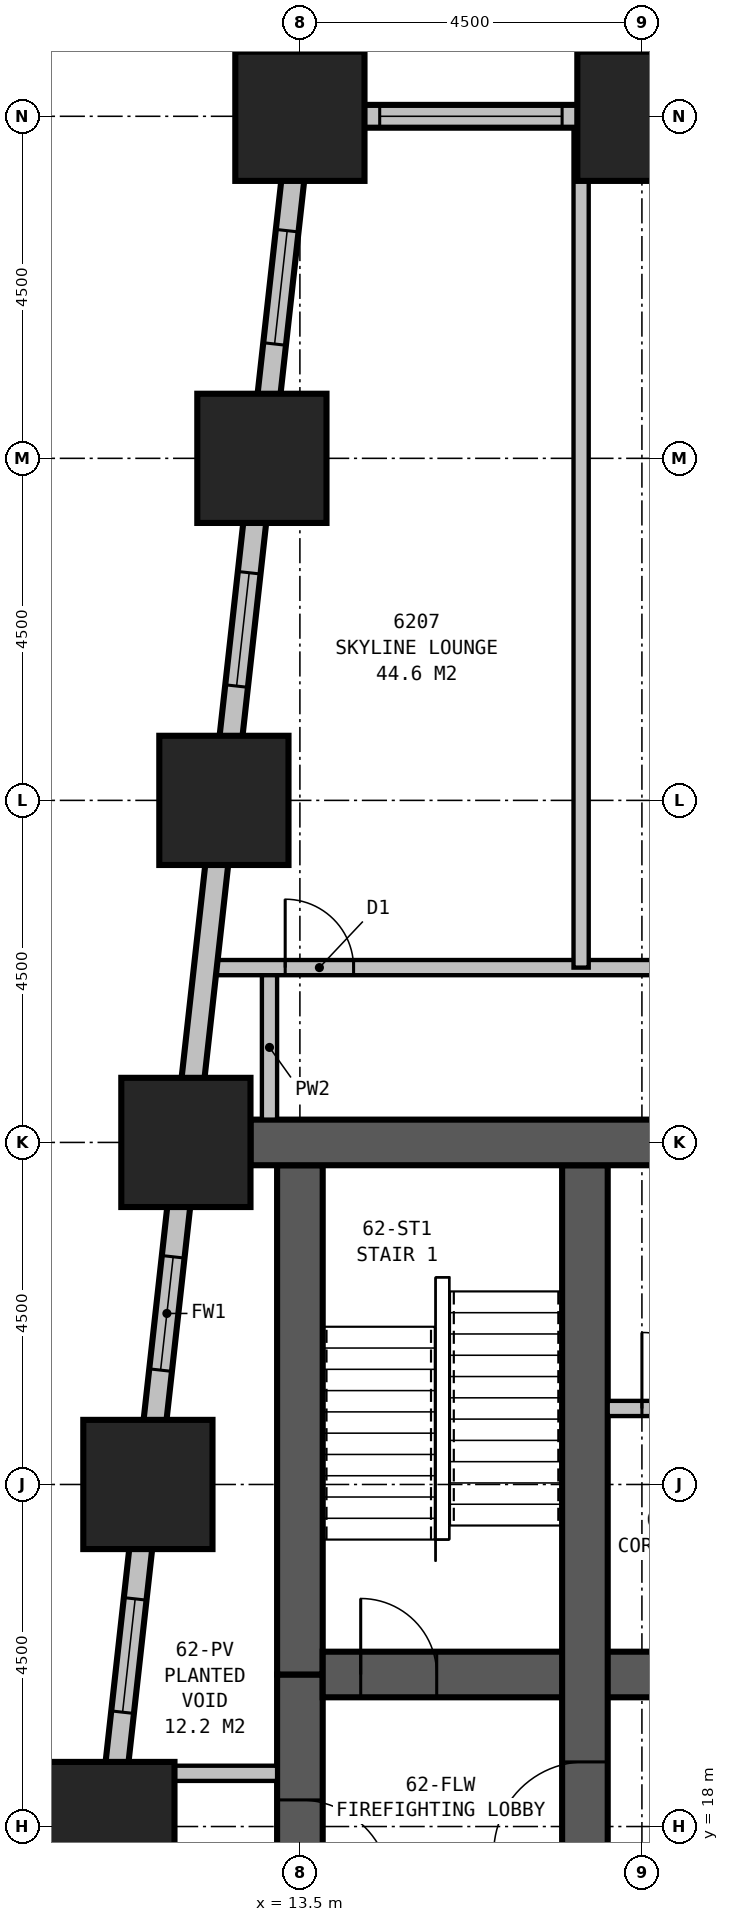
"""IFC4 building model, lengths in metres.
Left out: names, types, materials, properties, quantities, classifications, styles, units other than length and angle.
Written with IfcOpenShell. Run it as: python <this file> out.ifc"""

import sys

from ifc_helpers import new_model, si_unit, direction, frame, frame_2d, origin, origin_2d, place, context, subcontext, project, spatial, rectangle, extrude, element, fill, save


model = new_model("IFC4")
c1 = context("Model", 3, precision=1e-05, world=origin(), true_north=direction((0.0, 1.0)))
c2 = subcontext(c1, "Body", "Model", "MODEL_VIEW")
j1 = project(units=[si_unit("LENGTHUNIT", "METRE"), si_unit("PLANEANGLEUNIT", "RADIAN")], contexts=[c1])
p1 = place(None, origin())
s1 = spatial("IfcSite", under=j1, at=p1, CompositionType="ELEMENT")
p2 = place(p1, origin())
s2 = spatial("IfcBuilding", under=s1, at=p2, CompositionType="ELEMENT")
p3 = place(p2, frame((0.0, 0.0, 240.8)))
s3 = spatial("IfcBuildingStorey", under=s2, at=p3, CompositionType="ELEMENT", Elevation=240.8)
for number, where, z_axis, x_axis in (
    (1, (18.0, 40.5, 0.0), (0.0, 0.0, 1.0), (1.0, 0.0, 0.0)),
    (2, (13.5, 40.5, 0.0), (0.0, 0.0, 1.0), (1.0, 0.0, 0.0)),
    (3, (13.0, 36.0, 0.0), (0.0, 0.0, 1.0), (1.0, 0.0, 0.0)),
    (4, (12.5, 31.5, 0.0), (0.0, 0.0, 1.0), (1.0, 0.0, 0.0)),
    (5, (12.0, 27.0, 0.0), (0.0, 0.0, 1.0), (1.0, 0.0, 0.0)),
    (6, (11.5, 22.5, 0.0), (0.0, 0.0, 1.0), (1.0, 0.0, 0.0)),
    (7, (11.0, 18.0, 0.0), (0.0, 0.0, 1.0), (1.0, 0.0, 0.0)),
):
    element("IfcColumn", number, at=place(p3, frame(where, z_axis=z_axis, x_axis=x_axis)), inside=s3, PredefinedType="COLUMN", context=c2, shape_type="SweptSolid", body=[
        extrude(rectangle(XDim=1.7, YDim=1.7, at=origin_2d()), origin(), (0.0, 0.0, 1.0), 3.9),
    ])
p4 = place(p3, frame((36.3, 27.0, 0.0), z_axis=(0.0, 0.0, 1.0), x_axis=(-1.0, 0.0, 0.0)))
e8 = element("IfcWall", 8, at=p4, inside=s3, PredefinedType="SHEAR", context=c2, shape_type="SweptSolid", body=[
    extrude(rectangle(XDim=23.45, YDim=0.6, at=frame_2d((11.725, 0.0))), origin(), (0.0, 0.0, 1.0), 3.9),
])
p5 = place(p4, frame((17.05, 0.0, 0.0)))
e9 = element("IfcOpeningElement", 9, at=p5, cuts=e8, PredefinedType="OPENING", context=c2, shape_type="SweptSolid", body=[
    extrude(rectangle(XDim=1.0, YDim=2.1, at=frame_2d((0.5, 1.05))), frame((0.0, 0.31, 0.0), z_axis=(0.0, -1.0, 0.0), x_axis=(1.0, 0.0, 0.0)), (0.0, 0.0, 1.0), 0.62),
])
p6 = place(p4, frame((12.05, 0.0, 0.0)))
e10 = element("IfcOpeningElement", 10, at=p6, cuts=e8, PredefinedType="OPENING", context=c2, shape_type="SweptSolid", body=[
    extrude(rectangle(XDim=1.0, YDim=2.1, at=frame_2d((0.5, 1.05))), frame((0.0, 0.31, 0.0), z_axis=(0.0, -1.0, 0.0), x_axis=(1.0, 0.0, 0.0)), (0.0, 0.0, 1.0), 0.62),
])
p7 = place(p4, frame((7.05, 0.0, 0.0)))
e11 = element("IfcOpeningElement", 11, at=p7, cuts=e8, PredefinedType="OPENING", context=c2, shape_type="SweptSolid", body=[
    extrude(rectangle(XDim=1.0, YDim=2.1, at=frame_2d((0.5, 1.05))), frame((0.0, 0.31, 0.0), z_axis=(0.0, -1.0, 0.0), x_axis=(1.0, 0.0, 0.0)), (0.0, 0.0, 1.0), 0.62),
])
p8 = place(p3, frame((17.25, 13.8, 0.0), z_axis=(0.0, 0.0, 1.0), x_axis=(0.0, 1.0, 0.0)))
e12 = element("IfcWall", 12, at=p8, inside=s3, PredefinedType="SHEAR", context=c2, shape_type="SweptSolid", body=[
    extrude(rectangle(XDim=12.9, YDim=0.6, at=frame_2d((6.45, 0.0))), origin(), (0.0, 0.0, 1.0), 3.9),
])
p9 = place(p8, frame((3.85, 0.0, 0.0)))
e13 = element("IfcOpeningElement", 13, at=p9, cuts=e12, PredefinedType="OPENING", context=c2, shape_type="SweptSolid", body=[
    extrude(rectangle(XDim=1.2, YDim=2.1, at=frame_2d((0.6, 1.05))), frame((0.0, 0.31, 0.0), z_axis=(0.0, -1.0, 0.0), x_axis=(1.0, 0.0, 0.0)), (0.0, 0.0, 1.0), 0.62),
])
p10 = place(p3, frame((13.8, 20.0, 0.0), z_axis=(0.0, 0.0, 1.0), x_axis=(1.0, 0.0, 0.0)))
e14 = element("IfcWall", 14, at=p10, inside=s3, PredefinedType="SHEAR", context=c2, shape_type="SweptSolid", body=[
    extrude(rectangle(XDim=21.9, YDim=0.6, at=frame_2d((10.95, 0.0))), origin(), (0.0, 0.0, 1.0), 3.9),
])
p11 = place(p10, frame((0.5, 0.0, 0.0)))
e15 = element("IfcOpeningElement", 15, at=p11, cuts=e14, PredefinedType="OPENING", context=c2, shape_type="SweptSolid", body=[
    extrude(rectangle(XDim=1.0, YDim=2.1, at=frame_2d((0.5, 1.05))), frame((0.0, 0.31, 0.0), z_axis=(0.0, -1.0, 0.0), x_axis=(1.0, 0.0, 0.0)), (0.0, 0.0, 1.0), 0.62),
])
p12 = place(p10, frame((20.5, 0.0, 0.0)))
e16 = element("IfcOpeningElement", 16, at=p12, cuts=e14, PredefinedType="OPENING", context=c2, shape_type="SweptSolid", body=[
    extrude(rectangle(XDim=1.0, YDim=2.1, at=frame_2d((0.5, 1.05))), frame((0.0, 0.31, 0.0), z_axis=(0.0, -1.0, 0.0), x_axis=(1.0, 0.0, 0.0)), (0.0, 0.0, 1.0), 0.62),
])
p13 = place(p10, frame((9.15, 0.0, 0.0)))
e17 = element("IfcOpeningElement", 17, at=p13, cuts=e14, PredefinedType="OPENING", context=c2, shape_type="SweptSolid", body=[
    extrude(rectangle(XDim=1.1, YDim=2.1, at=frame_2d((0.55, 1.05))), frame((0.0, 0.31, 0.0), z_axis=(0.0, -1.0, 0.0), x_axis=(1.0, 0.0, 0.0)), (0.0, 0.0, 1.0), 0.62),
])
p14 = place(p10, frame((11.65, 0.0, 0.0)))
e18 = element("IfcOpeningElement", 18, at=p14, cuts=e14, PredefinedType="OPENING", context=c2, shape_type="SweptSolid", body=[
    extrude(rectangle(XDim=1.1, YDim=2.1, at=frame_2d((0.55, 1.05))), frame((0.0, 0.31, 0.0), z_axis=(0.0, -1.0, 0.0), x_axis=(1.0, 0.0, 0.0)), (0.0, 0.0, 1.0), 0.62),
])
p15 = place(p10, frame((14.15, 0.0, 0.0)))
e19 = element("IfcOpeningElement", 19, at=p15, cuts=e14, PredefinedType="OPENING", context=c2, shape_type="SweptSolid", body=[
    extrude(rectangle(XDim=1.1, YDim=2.1, at=frame_2d((0.55, 1.05))), frame((0.0, 0.31, 0.0), z_axis=(0.0, -1.0, 0.0), x_axis=(1.0, 0.0, 0.0)), (0.0, 0.0, 1.0), 0.62),
])
p16 = place(p10, frame((16.65, 0.0, 0.0)))
e20 = element("IfcOpeningElement", 20, at=p16, cuts=e14, PredefinedType="OPENING", context=c2, shape_type="SweptSolid", body=[
    extrude(rectangle(XDim=1.1, YDim=2.1, at=frame_2d((0.55, 1.05))), frame((0.0, 0.31, 0.0), z_axis=(0.0, -1.0, 0.0), x_axis=(1.0, 0.0, 0.0)), (0.0, 0.0, 1.0), 0.62),
])
p17 = place(p10, frame((5.75, 0.0, 0.0), z_axis=(0.0, 0.0, 1.0), x_axis=(-1.0, 0.0, 0.0)))
e21 = element("IfcOpeningElement", 21, at=p17, cuts=e14, PredefinedType="OPENING", context=c2, shape_type="SweptSolid", body=[
    extrude(rectangle(XDim=1.0, YDim=2.1, at=frame_2d((0.5, 1.05))), frame((0.0, 0.31, 0.0), z_axis=(0.0, -1.0, 0.0), x_axis=(1.0, 0.0, 0.0)), (0.0, 0.0, 1.0), 0.62),
])
p18 = place(p10, frame((6.7, 0.0, 0.0)))
e22 = element("IfcOpeningElement", 22, at=p18, cuts=e14, PredefinedType="OPENING", context=c2, shape_type="SweptSolid", body=[
    extrude(rectangle(XDim=1.0, YDim=2.1, at=frame_2d((0.5, 1.05))), frame((0.0, 0.31, 0.0), z_axis=(0.0, -1.0, 0.0), x_axis=(1.0, 0.0, 0.0)), (0.0, 0.0, 1.0), 0.62),
])
p19 = place(p3, frame((13.5, 26.7, 0.0), z_axis=(0.0, 0.0, 1.0), x_axis=(0.0, -1.0, 0.0)))
e23 = element("IfcWall", 23, at=p19, inside=s3, PredefinedType="SHEAR", context=c2, shape_type="SweptSolid", body=[
    extrude(rectangle(XDim=6.7, YDim=0.6, at=frame_2d((3.35, 0.0))), origin(), (0.0, 0.0, 1.0), 3.9),
])
p20 = place(p3, frame((13.5, 20.0, 0.0), z_axis=(0.0, 0.0, 1.0), x_axis=(0.0, -1.0, 0.0)))
e24 = element("IfcWall", 24, at=p20, inside=s3, PredefinedType="SHEAR", context=c2, shape_type="SweptSolid", body=[
    extrude(rectangle(XDim=3.5, YDim=0.6, at=frame_2d((1.75, 0.0))), origin(), (0.0, 0.0, 1.0), 3.9),
])
p21 = place(p20, frame((1.65, 0.0, 0.0)))
e25 = element("IfcOpeningElement", 25, at=p21, cuts=e24, PredefinedType="OPENING", context=c2, shape_type="SweptSolid", body=[
    extrude(rectangle(XDim=1.2, YDim=2.1, at=frame_2d((0.6, 1.05))), frame((0.0, 0.31, 0.0), z_axis=(0.0, -1.0, 0.0), x_axis=(1.0, 0.0, 0.0)), (0.0, 0.0, 1.0), 0.62),
])
p22 = place(p3, frame((40.65, 40.5, 0.0), z_axis=(0.0, 0.0, 1.0), x_axis=(-1.0, 0.0, 0.0)))
e26 = element("IfcWall", 26, at=p22, inside=s3, PredefinedType="STANDARD", context=c2, shape_type="SweptSolid", body=[
    extrude(rectangle(XDim=27.3, YDim=0.3, at=frame_2d((13.65, 0.0))), origin(), (0.0, 0.0, 1.0), 2.45),
])
p23 = place(p22, frame((1.2, 0.0, 0.5)))
e27 = element("IfcOpeningElement", 27, at=p23, cuts=e26, PredefinedType="OPENING", context=c2, shape_type="SweptSolid", body=[
    extrude(rectangle(XDim=2.4, YDim=1.75, at=frame_2d((1.2, 0.875))), frame((0.0, 0.16, 0.0), z_axis=(0.0, -1.0, 0.0), x_axis=(1.0, 0.0, 0.0)), (0.0, 0.0, 1.0), 0.32),
])
p24 = place(p22, frame((5.7, 0.0, 0.5)))
e28 = element("IfcOpeningElement", 28, at=p24, cuts=e26, PredefinedType="OPENING", context=c2, shape_type="SweptSolid", body=[
    extrude(rectangle(XDim=2.4, YDim=1.75, at=frame_2d((1.2, 0.875))), frame((0.0, 0.16, 0.0), z_axis=(0.0, -1.0, 0.0), x_axis=(1.0, 0.0, 0.0)), (0.0, 0.0, 1.0), 0.32),
])
p25 = place(p22, frame((10.2, 0.0, 0.5)))
e29 = element("IfcOpeningElement", 29, at=p25, cuts=e26, PredefinedType="OPENING", context=c2, shape_type="SweptSolid", body=[
    extrude(rectangle(XDim=2.4, YDim=1.75, at=frame_2d((1.2, 0.875))), frame((0.0, 0.16, 0.0), z_axis=(0.0, -1.0, 0.0), x_axis=(1.0, 0.0, 0.0)), (0.0, 0.0, 1.0), 0.32),
])
p26 = place(p22, frame((14.7, 0.0, 0.5)))
e30 = element("IfcOpeningElement", 30, at=p26, cuts=e26, PredefinedType="OPENING", context=c2, shape_type="SweptSolid", body=[
    extrude(rectangle(XDim=2.4, YDim=1.75, at=frame_2d((1.2, 0.875))), frame((0.0, 0.16, 0.0), z_axis=(0.0, -1.0, 0.0), x_axis=(1.0, 0.0, 0.0)), (0.0, 0.0, 1.0), 0.32),
])
p27 = place(p22, frame((19.2, 0.0, 0.5)))
e31 = element("IfcOpeningElement", 31, at=p27, cuts=e26, PredefinedType="OPENING", context=c2, shape_type="SweptSolid", body=[
    extrude(rectangle(XDim=2.4, YDim=1.75, at=frame_2d((1.2, 0.875))), frame((0.0, 0.16, 0.0), z_axis=(0.0, -1.0, 0.0), x_axis=(1.0, 0.0, 0.0)), (0.0, 0.0, 1.0), 0.32),
])
p28 = place(p22, frame((23.7, 0.0, 0.5)))
e32 = element("IfcOpeningElement", 32, at=p28, cuts=e26, PredefinedType="OPENING", context=c2, shape_type="SweptSolid", body=[
    extrude(rectangle(XDim=2.4, YDim=1.75, at=frame_2d((1.2, 0.875))), frame((0.0, 0.16, 0.0), z_axis=(0.0, -1.0, 0.0), x_axis=(1.0, 0.0, 0.0)), (0.0, 0.0, 1.0), 0.32),
])
p29 = place(p3, frame((13.517, 40.649, 0.0), z_axis=(0.0, 0.0, 1.0), x_axis=(-0.110433201132, -0.993883548555, 0.0)))
e33 = element("IfcWall", 33, at=p29, inside=s3, PredefinedType="STANDARD", context=c2, shape_type="SweptSolid", body=[
    extrude(rectangle(XDim=31.994, YDim=0.3, at=frame_2d((15.997, 0.0))), origin(), (0.0, 0.0, 1.0), 2.45),
])
p30 = place(p29, frame((1.664, 0.0, 0.5)))
e34 = element("IfcOpeningElement", 34, at=p30, cuts=e33, PredefinedType="OPENING", context=c2, shape_type="SweptSolid", body=[
    extrude(rectangle(XDim=1.5, YDim=1.75, at=frame_2d((0.75, 0.875))), frame((0.0, 0.16, 0.0), z_axis=(0.0, -1.0, 0.0), x_axis=(1.0, 0.0, 0.0)), (0.0, 0.0, 1.0), 0.32),
])
p31 = place(p29, frame((6.192, 0.0, 0.5)))
e35 = element("IfcOpeningElement", 35, at=p31, cuts=e33, PredefinedType="OPENING", context=c2, shape_type="SweptSolid", body=[
    extrude(rectangle(XDim=1.5, YDim=1.75, at=frame_2d((0.75, 0.875))), frame((0.0, 0.16, 0.0), z_axis=(0.0, -1.0, 0.0), x_axis=(1.0, 0.0, 0.0)), (0.0, 0.0, 1.0), 0.32),
])
p32 = place(p29, frame((15.247, 0.0, 0.5)))
e36 = element("IfcOpeningElement", 36, at=p32, cuts=e33, PredefinedType="OPENING", context=c2, shape_type="SweptSolid", body=[
    extrude(rectangle(XDim=1.5, YDim=1.75, at=frame_2d((0.75, 0.875))), frame((0.0, 0.16, 0.0), z_axis=(0.0, -1.0, 0.0), x_axis=(1.0, 0.0, 0.0)), (0.0, 0.0, 1.0), 0.32),
])
p33 = place(p29, frame((19.775, 0.0, 0.5)))
e37 = element("IfcOpeningElement", 37, at=p33, cuts=e33, PredefinedType="OPENING", context=c2, shape_type="SweptSolid", body=[
    extrude(rectangle(XDim=1.5, YDim=1.75, at=frame_2d((0.75, 0.875))), frame((0.0, 0.16, 0.0), z_axis=(0.0, -1.0, 0.0), x_axis=(1.0, 0.0, 0.0)), (0.0, 0.0, 1.0), 0.32),
])
p34 = place(p29, frame((24.302, 0.0, 0.5)))
e38 = element("IfcOpeningElement", 38, at=p34, cuts=e33, PredefinedType="OPENING", context=c2, shape_type="SweptSolid", body=[
    extrude(rectangle(XDim=1.5, YDim=1.75, at=frame_2d((0.75, 0.875))), frame((0.0, 0.16, 0.0), z_axis=(0.0, -1.0, 0.0), x_axis=(1.0, 0.0, 0.0)), (0.0, 0.0, 1.0), 0.32),
])
p35 = place(p29, frame((28.83, 0.0, 0.5)))
e39 = element("IfcOpeningElement", 39, at=p35, cuts=e33, PredefinedType="OPENING", context=c2, shape_type="SweptSolid", body=[
    extrude(rectangle(XDim=1.5, YDim=1.75, at=frame_2d((0.75, 0.875))), frame((0.0, 0.16, 0.0), z_axis=(0.0, -1.0, 0.0), x_axis=(1.0, 0.0, 0.0)), (0.0, 0.0, 1.0), 0.32),
])
p36 = place(p3, frame((12.406, 29.3, 0.0), z_axis=(0.0, 0.0, 1.0), x_axis=(1.0, 0.0, 0.0)))
e40 = element("IfcWall", 40, at=p36, inside=s3, PredefinedType="PARTITIONING", context=c2, shape_type="SweptSolid", body=[
    extrude(rectangle(XDim=25.894, YDim=0.2, at=frame_2d((12.947, 0.0))), origin(), (0.0, 0.0, 1.0), 3.65),
])
p37 = place(p36, frame((0.9, 0.0, 0.0)))
e41 = element("IfcOpeningElement", 41, at=p37, cuts=e40, PredefinedType="OPENING", context=c2, shape_type="SweptSolid", body=[
    extrude(rectangle(XDim=0.9, YDim=2.1, at=frame_2d((0.45, 1.05))), frame((0.0, 0.11, 0.0), z_axis=(0.0, -1.0, 0.0), x_axis=(1.0, 0.0, 0.0)), (0.0, 0.0, 1.0), 0.22),
])
p38 = place(p36, frame((6.444, 0.0, 0.0)))
e42 = element("IfcOpeningElement", 42, at=p38, cuts=e40, PredefinedType="OPENING", context=c2, shape_type="SweptSolid", body=[
    extrude(rectangle(XDim=0.9, YDim=2.1, at=frame_2d((0.45, 1.05))), frame((0.0, 0.11, 0.0), z_axis=(0.0, -1.0, 0.0), x_axis=(1.0, 0.0, 0.0)), (0.0, 0.0, 1.0), 0.22),
])
p39 = place(p36, frame((14.644, 0.0, 0.0)))
e43 = element("IfcOpeningElement", 43, at=p39, cuts=e40, PredefinedType="OPENING", context=c2, shape_type="SweptSolid", body=[
    extrude(rectangle(XDim=0.9, YDim=2.1, at=frame_2d((0.45, 1.05))), frame((0.0, 0.11, 0.0), z_axis=(0.0, -1.0, 0.0), x_axis=(1.0, 0.0, 0.0)), (0.0, 0.0, 1.0), 0.22),
])
p40 = place(p36, frame((24.293, 0.0, 0.0)))
e44 = element("IfcOpeningElement", 44, at=p40, cuts=e40, PredefinedType="OPENING", context=c2, shape_type="SweptSolid", body=[
    extrude(rectangle(XDim=0.9, YDim=2.1, at=frame_2d((0.45, 1.05))), frame((0.0, 0.11, 0.0), z_axis=(0.0, -1.0, 0.0), x_axis=(1.0, 0.0, 0.0)), (0.0, 0.0, 1.0), 0.22),
])
p41 = place(p3, frame((13.2, 18.7, 0.0), z_axis=(0.0, 0.0, 1.0), x_axis=(-1.0, 0.0, 0.0)))
e45 = element("IfcWall", 45, at=p41, inside=s3, PredefinedType="PARTITIONING", context=c2, shape_type="SweptSolid", body=[
    extrude(rectangle(XDim=1.35, YDim=0.2, at=frame_2d((0.675, 0.0))), origin(), (0.0, 0.0, 1.0), 3.65),
])
p42 = place(p3, frame((13.1, 27.3, 0.0), z_axis=(0.0, 0.0, 1.0), x_axis=(0.0, 1.0, 0.0)))
e46 = element("IfcWall", 46, at=p42, inside=s3, PredefinedType="PARTITIONING", context=c2, shape_type="SweptSolid", body=[
    extrude(rectangle(XDim=1.9, YDim=0.2, at=frame_2d((0.95, 0.0))), origin(), (0.0, 0.0, 1.0), 2.45),
])
p43 = place(p3, frame((17.2, 29.3, 0.0), z_axis=(0.0, 0.0, 1.0), x_axis=(0.0, 1.0, 0.0)))
e47 = element("IfcWall", 47, at=p43, inside=s3, PredefinedType="PARTITIONING", context=c2, shape_type="SweptSolid", body=[
    extrude(rectangle(XDim=11.2, YDim=0.2, at=frame_2d((5.6, 0.0))), origin(), (0.0, 0.0, 1.0), 2.6),
])
p44 = place(p3, frame((17.55, 23.5, 0.0), z_axis=(0.0, 0.0, 1.0), x_axis=(1.0, 0.0, 0.0)))
e48 = element("IfcWall", 48, at=p44, inside=s3, PredefinedType="PARTITIONING", context=c2, shape_type="SweptSolid", body=[
    extrude(rectangle(XDim=14.4, YDim=0.2, at=frame_2d((7.2, 0.0))), origin(), (0.0, 0.0, 1.0), 3.65),
])
p45 = place(p44, frame((0.45, 0.0, 0.0)))
e49 = element("IfcOpeningElement", 49, at=p45, cuts=e48, PredefinedType="OPENING", context=c2, shape_type="SweptSolid", body=[
    extrude(rectangle(XDim=1.0, YDim=2.1, at=frame_2d((0.5, 1.05))), frame((0.0, 0.11, 0.0), z_axis=(0.0, -1.0, 0.0), x_axis=(1.0, 0.0, 0.0)), (0.0, 0.0, 1.0), 0.22),
])
p46 = place(p28, origin())
e50 = element("IfcWindow", 50, at=p46, inside=s3, PartitioningType="SINGLE_PANEL", PredefinedType="WINDOW", context=c2, shape_type="SweptSolid", body=[
    extrude(rectangle(XDim=2.4, YDim=1.75, at=frame_2d((1.2, 0.875))), frame((0.0, 0.03, 0.0), z_axis=(0.0, -1.0, 0.0), x_axis=(1.0, 0.0, 0.0)), (0.0, 0.0, 1.0), 0.06),
])
fill(e32, e50)
p47 = place(p30, origin())
e51 = element("IfcWindow", 51, at=p47, inside=s3, PartitioningType="SINGLE_PANEL", PredefinedType="WINDOW", context=c2, shape_type="SweptSolid", body=[
    extrude(rectangle(XDim=1.5, YDim=1.75, at=frame_2d((0.75, 0.875))), frame((0.0, 0.03, 0.0), z_axis=(0.0, -1.0, 0.0), x_axis=(1.0, 0.0, 0.0)), (0.0, 0.0, 1.0), 0.06),
])
fill(e34, e51)
p48 = place(p31, origin())
e52 = element("IfcWindow", 52, at=p48, inside=s3, PartitioningType="SINGLE_PANEL", PredefinedType="WINDOW", context=c2, shape_type="SweptSolid", body=[
    extrude(rectangle(XDim=1.5, YDim=1.75, at=frame_2d((0.75, 0.875))), frame((0.0, 0.03, 0.0), z_axis=(0.0, -1.0, 0.0), x_axis=(1.0, 0.0, 0.0)), (0.0, 0.0, 1.0), 0.06),
])
fill(e35, e52)
p49 = place(p32, origin())
e53 = element("IfcWindow", 53, at=p49, inside=s3, PartitioningType="SINGLE_PANEL", PredefinedType="WINDOW", context=c2, shape_type="SweptSolid", body=[
    extrude(rectangle(XDim=1.5, YDim=1.75, at=frame_2d((0.75, 0.875))), frame((0.0, 0.03, 0.0), z_axis=(0.0, -1.0, 0.0), x_axis=(1.0, 0.0, 0.0)), (0.0, 0.0, 1.0), 0.06),
])
fill(e36, e53)
p50 = place(p33, origin())
e54 = element("IfcWindow", 54, at=p50, inside=s3, PartitioningType="SINGLE_PANEL", PredefinedType="WINDOW", context=c2, shape_type="SweptSolid", body=[
    extrude(rectangle(XDim=1.5, YDim=1.75, at=frame_2d((0.75, 0.875))), frame((0.0, 0.03, 0.0), z_axis=(0.0, -1.0, 0.0), x_axis=(1.0, 0.0, 0.0)), (0.0, 0.0, 1.0), 0.06),
])
fill(e37, e54)
p51 = place(p37, origin())
e55 = element("IfcDoor", 55, at=p51, inside=s3, OperationType="SINGLE_SWING_LEFT", PredefinedType="DOOR", context=c2, shape_type="SweptSolid", body=[
    extrude(rectangle(XDim=0.9, YDim=2.1, at=frame_2d((0.45, 1.05))), frame((0.0, 0.025, 0.0), z_axis=(0.0, -1.0, 0.0), x_axis=(1.0, 0.0, 0.0)), (0.0, 0.0, 1.0), 0.05),
])
fill(e41, e55)
p52 = place(p45, origin())
e56 = element("IfcDoor", 56, at=p52, inside=s3, OperationType="SINGLE_SWING_LEFT", PredefinedType="DOOR", context=c2, shape_type="SweptSolid", body=[
    extrude(rectangle(XDim=1.0, YDim=2.1, at=frame_2d((0.5, 1.05))), frame((0.0, 0.025, 0.0), z_axis=(0.0, -1.0, 0.0), x_axis=(1.0, 0.0, 0.0)), (0.0, 0.0, 1.0), 0.05),
])
fill(e49, e56)
p53 = place(p21, origin())
e57 = element("IfcDoor", 57, at=p53, inside=s3, OperationType="SINGLE_SWING_RIGHT", PredefinedType="DOOR", context=c2, shape_type="SweptSolid", body=[
    extrude(rectangle(XDim=1.2, YDim=2.1, at=frame_2d((0.6, 1.05))), frame((0.0, 0.3, 0.0), z_axis=(0.0, -1.0, 0.0), x_axis=(1.0, 0.0, 0.0)), (0.0, 0.0, 1.0), 0.6),
])
fill(e25, e57)
p54 = place(p9, origin())
e58 = element("IfcDoor", 58, at=p54, inside=s3, OperationType="SINGLE_SWING_LEFT", PredefinedType="DOOR", context=c2, shape_type="SweptSolid", body=[
    extrude(rectangle(XDim=1.2, YDim=2.1, at=frame_2d((0.6, 1.05))), frame((0.0, 0.3, 0.0), z_axis=(0.0, -1.0, 0.0), x_axis=(1.0, 0.0, 0.0)), (0.0, 0.0, 1.0), 0.6),
])
fill(e13, e58)
p55 = place(p11, origin())
e59 = element("IfcDoor", 59, at=p55, inside=s3, OperationType="SINGLE_SWING_LEFT", PredefinedType="DOOR", context=c2, shape_type="SweptSolid", body=[
    extrude(rectangle(XDim=1.0, YDim=2.1, at=frame_2d((0.5, 1.05))), frame((0.0, 0.3, 0.0), z_axis=(0.0, -1.0, 0.0), x_axis=(1.0, 0.0, 0.0)), (0.0, 0.0, 1.0), 0.6),
])
fill(e15, e59)
save(model, sys.argv[1])
